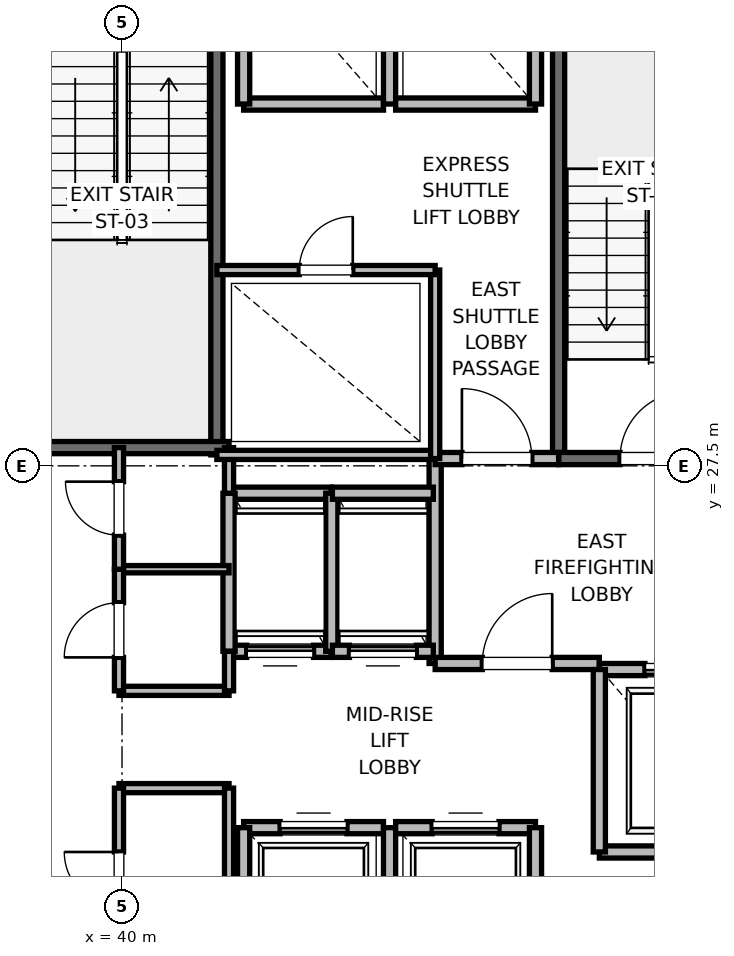
"""IFC4 building model, lengths in metres.
Left out: names, types, materials, properties, quantities, classifications, styles, units other than length and angle.
Written with IfcOpenShell. Run it as: python <this file> out.ifc"""

import sys

from ifc_helpers import new_model, si_unit, direction, frame, frame_2d, origin, place, context, subcontext, project, spatial, rectangle, extrude, element, fill, save


model = new_model("IFC4")
c1 = context("Model", 3, precision=1e-05, world=origin(), true_north=direction((0.0, 1.0)))
c2 = subcontext(c1, "Body", "Model", "MODEL_VIEW")
j1 = project(units=[si_unit("LENGTHUNIT", "METRE"), si_unit("PLANEANGLEUNIT", "RADIAN")], contexts=[c1])
p1 = place(None, origin())
s1 = spatial("IfcSite", under=j1, at=p1, CompositionType="ELEMENT")
p2 = place(p1, origin())
s2 = spatial("IfcBuilding", under=s1, at=p2, CompositionType="ELEMENT")
p3 = place(p2, frame((0.0, 0.0, 176.4)))
s3 = spatial("IfcBuildingStorey", under=s2, at=p3, CompositionType="ELEMENT", Elevation=176.4)
p4 = place(p3, frame((47.18, 27.62, 0.0), z_axis=(0.0, 0.0, 1.0), x_axis=(0.0, 1.0, 0.0)))
e1 = element("IfcWall", 1, at=p4, inside=s3, PredefinedType="SOLIDWALL", context=c2, shape_type="SweptSolid", body=[
    extrude(rectangle(XDim=8.18, YDim=0.2, at=frame_2d((4.09, 0.0))), origin(), (0.0, 0.0, 1.0), 3.775),
])
p5 = place(p3, frame((47.18, 27.62, 0.0), z_axis=(0.0, 0.0, 1.0), x_axis=(1.0, 0.0, 0.0)))
e2 = element("IfcWall", 2, at=p5, inside=s3, PredefinedType="SOLIDWALL", context=c2, shape_type="SweptSolid", body=[
    extrude(rectangle(XDim=3.12, YDim=0.2, at=frame_2d((1.56, 0.0))), origin(), (0.0, 0.0, 1.0), 3.775),
])
p6 = place(p5, frame((1.01, 0.0, 0.0)))
e3 = element("IfcOpeningElement", 3, at=p6, cuts=e2, PredefinedType="OPENING", context=c2, shape_type="SweptSolid", body=[
    extrude(rectangle(XDim=1.1, YDim=2.15, at=frame_2d((0.55, 1.075))), frame((0.0, 0.1, 0.0), z_axis=(0.0, -1.0, 0.0), x_axis=(1.0, 0.0, 0.0)), (0.0, 0.0, 1.0), 0.2),
])
p7 = place(p3, frame((41.56, 27.68, 0.0), z_axis=(0.0, 0.0, 1.0), x_axis=(0.0, 1.0, 0.0)))
e4 = element("IfcWall", 4, at=p7, inside=s3, PredefinedType="SOLIDWALL", context=c2, shape_type="SweptSolid", body=[
    extrude(rectangle(XDim=8.57, YDim=0.2, at=frame_2d((4.285, 0.0))), origin(), (0.0, 0.0, 1.0), 3.775),
])
p8 = place(p3, frame((38.44, 27.8, 0.0), z_axis=(0.0, 0.0, 1.0), x_axis=(1.0, 0.0, 0.0)))
e5 = element("IfcWall", 5, at=p8, inside=s3, PredefinedType="SOLIDWALL", context=c2, shape_type="SweptSolid", body=[
    extrude(rectangle(XDim=3.32, YDim=0.2, at=frame_2d((1.66, 0.0))), origin(), (0.0, 0.0, 1.0), 3.775),
])
p9 = place(p3, frame((45.15, 24.25, 0.0), z_axis=(0.0, 0.0, 1.0), x_axis=(0.0, 1.0, 0.0)))
e6 = element("IfcWall", 6, at=p9, inside=s3, PredefinedType="PARTITIONING", context=c2, shape_type="SweptSolid", body=[
    extrude(rectangle(XDim=3.37, YDim=0.2, at=frame_2d((1.685, 0.0))), origin(), (0.0, 0.0, 1.0), 3.775),
])
p10 = place(p3, frame((45.15, 24.25, 0.0), z_axis=(0.0, 0.0, 1.0), x_axis=(1.0, 0.0, 0.0)))
e7 = element("IfcWall", 7, at=p10, inside=s3, PredefinedType="PARTITIONING", context=c2, shape_type="SweptSolid", body=[
    extrude(rectangle(XDim=2.7, YDim=0.2, at=frame_2d((1.35, 0.0))), origin(), (0.0, 0.0, 1.0), 3.775),
])
p11 = place(p10, frame((0.775, 0.0, 0.0)))
e8 = element("IfcOpeningElement", 8, at=p11, cuts=e7, PredefinedType="OPENING", context=c2, shape_type="SweptSolid", body=[
    extrude(rectangle(XDim=1.15, YDim=2.2, at=frame_2d((0.575, 1.1))), frame((0.0, 0.1, 0.0), z_axis=(0.0, -1.0, 0.0), x_axis=(1.0, 0.0, 0.0)), (0.0, 0.0, 1.0), 0.2),
])
p12 = place(p3, frame((45.15, 27.62, 0.0), z_axis=(0.0, 0.0, 1.0), x_axis=(1.0, 0.0, 0.0)))
e9 = element("IfcWall", 9, at=p12, inside=s3, PredefinedType="PARTITIONING", context=c2, shape_type="SweptSolid", body=[
    extrude(rectangle(XDim=2.03, YDim=0.2, at=frame_2d((1.015, 0.0))), origin(), (0.0, 0.0, 1.0), 3.775),
])
p13 = place(p12, frame((0.44, 0.0, 0.0)))
e10 = element("IfcOpeningElement", 10, at=p13, cuts=e9, PredefinedType="OPENING", context=c2, shape_type="SweptSolid", body=[
    extrude(rectangle(XDim=1.15, YDim=2.2, at=frame_2d((0.575, 1.1))), frame((0.0, 0.1, 0.0), z_axis=(0.0, -1.0, 0.0), x_axis=(1.0, 0.0, 0.0)), (0.0, 0.0, 1.0), 0.2),
])
p14 = place(p3, frame((47.85, 21.15, 0.0), z_axis=(0.0, 0.0, 1.0), x_axis=(1.0, 0.0, 0.0)))
e11 = element("IfcWall", 11, at=p14, inside=s3, PredefinedType="SOLIDWALL", context=c2, shape_type="SweptSolid", body=[
    extrude(rectangle(XDim=2.6, YDim=0.2, at=frame_2d((1.3, 0.0))), origin(), (0.0, 0.0, 1.0), 3.775),
])
p15 = place(p3, frame((50.45, 24.15, 0.0), z_axis=(0.0, 0.0, 1.0), x_axis=(-1.0, 0.0, 0.0)))
e12 = element("IfcWall", 12, at=p15, inside=s3, PredefinedType="SOLIDWALL", context=c2, shape_type="SweptSolid", body=[
    extrude(rectangle(XDim=2.6, YDim=0.2, at=frame_2d((1.3, 0.0))), origin(), (0.0, 0.0, 1.0), 2.755),
])
p16 = place(p15, frame((0.75, 0.0, 0.0)))
e13 = element("IfcOpeningElement", 13, at=p16, cuts=e12, PredefinedType="OPENING", context=c2, shape_type="SweptSolid", body=[
    extrude(rectangle(XDim=1.1, YDim=2.2, at=frame_2d((0.55, 1.1))), frame((0.0, 0.1, 0.0), z_axis=(0.0, -1.0, 0.0), x_axis=(1.0, 0.0, 0.0)), (0.0, 0.0, 1.0), 0.2),
])
p17 = place(p3, frame((47.85, 24.15, 0.0), z_axis=(0.0, 0.0, 1.0), x_axis=(0.0, -1.0, 0.0)))
e14 = element("IfcWall", 14, at=p17, inside=s3, PredefinedType="SOLIDWALL", context=c2, shape_type="SweptSolid", body=[
    extrude(rectangle(XDim=3.0, YDim=0.2, at=frame_2d((1.5, 0.0))), origin(), (0.0, 0.0, 1.0), 3.775),
])
p18 = place(p3, frame((44.3, 21.55, 0.0), z_axis=(0.0, 0.0, 1.0), x_axis=(-1.0, 0.0, 0.0)))
e15 = element("IfcWall", 15, at=p18, inside=s3, PredefinedType="SOLIDWALL", context=c2, shape_type="SweptSolid", body=[
    extrude(rectangle(XDim=2.3, YDim=0.2, at=frame_2d((1.15, 0.0))), origin(), (0.0, 0.0, 1.0), 3.775),
])
p19 = place(p18, frame((0.6, 0.0, 0.0)))
e16 = element("IfcOpeningElement", 16, at=p19, cuts=e15, PredefinedType="OPENING", context=c2, shape_type="SweptSolid", body=[
    extrude(rectangle(XDim=1.1, YDim=2.2, at=frame_2d((0.55, 1.1))), frame((0.0, 0.1, 0.0), z_axis=(0.0, -1.0, 0.0), x_axis=(1.0, 0.0, 0.0)), (0.0, 0.0, 1.0), 0.2),
])
p20 = place(p3, frame((42.0, 21.55, 0.0), z_axis=(0.0, 0.0, 1.0), x_axis=(0.0, -1.0, 0.0)))
e17 = element("IfcWall", 17, at=p20, inside=s3, PredefinedType="SOLIDWALL", context=c2, shape_type="SweptSolid", body=[
    extrude(rectangle(XDim=2.6, YDim=0.2, at=frame_2d((1.3, 0.0))), origin(), (0.0, 0.0, 1.0), 2.755),
])
p21 = place(p3, frame((44.4, 18.95, 0.0), z_axis=(0.0, 0.0, 1.0), x_axis=(0.0, 1.0, 0.0)))
e18 = element("IfcWall", 18, at=p21, inside=s3, PredefinedType="SOLIDWALL", context=c2, shape_type="SweptSolid", body=[
    extrude(rectangle(XDim=2.6, YDim=0.2, at=frame_2d((1.3, 0.0))), origin(), (0.0, 0.0, 1.0), 3.775),
])
p22 = place(p3, frame((46.8, 21.55, 0.0), z_axis=(0.0, 0.0, 1.0), x_axis=(-1.0, 0.0, 0.0)))
e19 = element("IfcWall", 19, at=p22, inside=s3, PredefinedType="SOLIDWALL", context=c2, shape_type="SweptSolid", body=[
    extrude(rectangle(XDim=2.3, YDim=0.2, at=frame_2d((1.15, 0.0))), origin(), (0.0, 0.0, 1.0), 3.775),
])
p23 = place(p22, frame((0.6, 0.0, 0.0)))
e20 = element("IfcOpeningElement", 20, at=p23, cuts=e19, PredefinedType="OPENING", context=c2, shape_type="SweptSolid", body=[
    extrude(rectangle(XDim=1.1, YDim=2.2, at=frame_2d((0.55, 1.1))), frame((0.0, 0.1, 0.0), z_axis=(0.0, -1.0, 0.0), x_axis=(1.0, 0.0, 0.0)), (0.0, 0.0, 1.0), 0.2),
])
p24 = place(p3, frame((46.8, 18.95, 0.0), z_axis=(0.0, 0.0, 1.0), x_axis=(0.0, 1.0, 0.0)))
e21 = element("IfcWall", 21, at=p24, inside=s3, PredefinedType="SOLIDWALL", context=c2, shape_type="SweptSolid", body=[
    extrude(rectangle(XDim=2.6, YDim=0.2, at=frame_2d((1.3, 0.0))), origin(), (0.0, 0.0, 1.0), 3.775),
])
p25 = place(p3, frame((41.76, 24.45, 0.0), z_axis=(0.0, 0.0, 1.0), x_axis=(1.0, 0.0, 0.0)))
e22 = element("IfcWall", 22, at=p25, inside=s3, PredefinedType="SOLIDWALL", context=c2, shape_type="SweptSolid", body=[
    extrude(rectangle(XDim=1.68, YDim=0.2, at=frame_2d((0.84, 0.0))), origin(), (0.0, 0.0, 1.0), 3.775),
])
p26 = place(p25, frame((0.29, 0.0, 0.0)))
e23 = element("IfcOpeningElement", 23, at=p26, cuts=e22, PredefinedType="OPENING", context=c2, shape_type="SweptSolid", body=[
    extrude(rectangle(XDim=1.1, YDim=2.2, at=frame_2d((0.55, 1.1))), frame((0.0, 0.1, 0.0), z_axis=(0.0, -1.0, 0.0), x_axis=(1.0, 0.0, 0.0)), (0.0, 0.0, 1.0), 0.2),
])
p27 = place(p3, frame((43.44, 27.05, 0.0), z_axis=(0.0, 0.0, 1.0), x_axis=(-1.0, 0.0, 0.0)))
e24 = element("IfcWall", 24, at=p27, inside=s3, PredefinedType="SOLIDWALL", context=c2, shape_type="SweptSolid", body=[
    extrude(rectangle(XDim=1.68, YDim=0.2, at=frame_2d((0.84, 0.0))), origin(), (0.0, 0.0, 1.0), 3.775),
])
for number, where, z_axis, x_axis in (
    (25, (41.76, 27.05, 0.0), (0.0, 0.0, 1.0), (0.0, -1.0, 0.0)),
    (26, (43.45, 24.45, 0.0), (0.0, 0.0, 1.0), (0.0, 1.0, 0.0)),
):
    element("IfcWall", number, at=place(p3, frame(where, z_axis=z_axis, x_axis=x_axis)), inside=s3, PredefinedType="SOLIDWALL", context=c2, shape_type="SweptSolid", body=[
        extrude(rectangle(XDim=2.6, YDim=0.2, at=frame_2d((1.3, 0.0))), origin(), (0.0, 0.0, 1.0), 3.775),
    ])
p28 = place(p3, frame((43.46, 24.45, 0.0), z_axis=(0.0, 0.0, 1.0), x_axis=(1.0, 0.0, 0.0)))
e27 = element("IfcWall", 27, at=p28, inside=s3, PredefinedType="SOLIDWALL", context=c2, shape_type="SweptSolid", body=[
    extrude(rectangle(XDim=1.66, YDim=0.2, at=frame_2d((0.83, 0.0))), origin(), (0.0, 0.0, 1.0), 3.775),
])
p29 = place(p28, frame((0.28, 0.0, 0.0)))
e28 = element("IfcOpeningElement", 28, at=p29, cuts=e27, PredefinedType="OPENING", context=c2, shape_type="SweptSolid", body=[
    extrude(rectangle(XDim=1.1, YDim=2.2, at=frame_2d((0.55, 1.1))), frame((0.0, 0.1, 0.0), z_axis=(0.0, -1.0, 0.0), x_axis=(1.0, 0.0, 0.0)), (0.0, 0.0, 1.0), 0.2),
])
p30 = place(p3, frame((45.12, 27.05, 0.0), z_axis=(0.0, 0.0, 1.0), x_axis=(-1.0, 0.0, 0.0)))
e29 = element("IfcWall", 29, at=p30, inside=s3, PredefinedType="SOLIDWALL", context=c2, shape_type="SweptSolid", body=[
    extrude(rectangle(XDim=1.66, YDim=0.2, at=frame_2d((0.83, 0.0))), origin(), (0.0, 0.0, 1.0), 3.775),
])
p31 = place(p3, frame((42.0, 33.45, 0.0), z_axis=(0.0, 0.0, 1.0), x_axis=(1.0, 0.0, 0.0)))
e30 = element("IfcWall", 30, at=p31, inside=s3, PredefinedType="SOLIDWALL", context=c2, shape_type="SweptSolid", body=[
    extrude(rectangle(XDim=2.3, YDim=0.2, at=frame_2d((1.15, 0.0))), origin(), (0.0, 0.0, 1.0), 3.775),
])
for number, where, z_axis, x_axis in (
    (31, (42.0, 36.05, 0.0), (0.0, 0.0, 1.0), (0.0, -1.0, 0.0)),
    (32, (44.4, 33.45, 0.0), (0.0, 0.0, 1.0), (0.0, 1.0, 0.0)),
):
    element("IfcWall", number, at=place(p3, frame(where, z_axis=z_axis, x_axis=x_axis)), inside=s3, PredefinedType="SOLIDWALL", context=c2, shape_type="SweptSolid", body=[
        extrude(rectangle(XDim=2.6, YDim=0.2, at=frame_2d((1.3, 0.0))), origin(), (0.0, 0.0, 1.0), 2.755),
    ])
p32 = place(p3, frame((44.5, 33.45, 0.0), z_axis=(0.0, 0.0, 1.0), x_axis=(1.0, 0.0, 0.0)))
e33 = element("IfcWall", 33, at=p32, inside=s3, PredefinedType="SOLIDWALL", context=c2, shape_type="SweptSolid", body=[
    extrude(rectangle(XDim=2.3, YDim=0.2, at=frame_2d((1.15, 0.0))), origin(), (0.0, 0.0, 1.0), 3.775),
])
p33 = place(p3, frame((46.8, 33.45, 0.0), z_axis=(0.0, 0.0, 1.0), x_axis=(0.0, 1.0, 0.0)))
e34 = element("IfcWall", 34, at=p33, inside=s3, PredefinedType="SOLIDWALL", context=c2, shape_type="SweptSolid", body=[
    extrude(rectangle(XDim=2.6, YDim=0.2, at=frame_2d((1.3, 0.0))), origin(), (0.0, 0.0, 1.0), 3.775),
])
for number, where, z_axis, x_axis in (
    (35, (39.95, 22.2, 0.0), (0.0, 0.0, 1.0), (1.0, 0.0, 0.0)),
    (36, (39.95, 23.8, 0.0), (0.0, 0.0, 1.0), (1.0, 0.0, 0.0)),
):
    element("IfcWall", number, at=place(p3, frame(where, z_axis=z_axis, x_axis=x_axis)), inside=s3, PredefinedType="PARTITIONING", context=c2, shape_type="SweptSolid", body=[
        extrude(rectangle(XDim=1.81, YDim=0.15, at=frame_2d((0.905, 0.0))), origin(), (0.0, 0.0, 1.0), 2.85),
    ])
p34 = place(p3, frame((39.95, 25.8, 0.0), z_axis=(0.0, 0.0, 1.0), x_axis=(1.0, 0.0, 0.0)))
e37 = element("IfcWall", 37, at=p34, inside=s3, PredefinedType="PARTITIONING", context=c2, shape_type="SweptSolid", body=[
    extrude(rectangle(XDim=1.81, YDim=0.12, at=frame_2d((0.905, 0.0))), origin(), (0.0, 0.0, 1.0), 2.85),
])
p35 = place(p3, frame((41.76, 18.6, 0.0), z_axis=(0.0, 0.0, 1.0), x_axis=(0.0, 1.0, 0.0)))
e38 = element("IfcWall", 38, at=p35, inside=s3, PredefinedType="PARTITIONING", context=c2, shape_type="SweptSolid", body=[
    extrude(rectangle(XDim=3.6, YDim=0.15, at=frame_2d((1.8, 0.0))), origin(), (0.0, 0.0, 1.0), 2.755),
])
p36 = place(p3, frame((41.76, 23.8, 0.0), z_axis=(0.0, 0.0, 1.0), x_axis=(0.0, 1.0, 0.0)))
e39 = element("IfcWall", 39, at=p36, inside=s3, PredefinedType="PARTITIONING", context=c2, shape_type="SweptSolid", body=[
    extrude(rectangle(XDim=0.65, YDim=0.15, at=frame_2d((0.325, 0.0))), origin(), (0.0, 0.0, 1.0), 2.85),
])
p37 = place(p3, frame((41.76, 27.05, 0.0), z_axis=(0.0, 0.0, 1.0), x_axis=(0.0, 1.0, 0.0)))
e40 = element("IfcWall", 40, at=p37, inside=s3, PredefinedType="PARTITIONING", context=c2, shape_type="SweptSolid", body=[
    extrude(rectangle(XDim=0.75, YDim=0.15, at=frame_2d((0.375, 0.0))), origin(), (0.0, 0.0, 1.0), 2.85),
])
p38 = place(p3, frame((39.95, 19.2, 0.0), z_axis=(0.0, 0.0, 1.0), x_axis=(0.0, 1.0, 0.0)))
e41 = element("IfcWall", 41, at=p38, inside=s3, PredefinedType="PARTITIONING", context=c2, shape_type="SweptSolid", body=[
    extrude(rectangle(XDim=3.0, YDim=0.15, at=frame_2d((1.5, 0.0))), origin(), (0.0, 0.0, 1.0), 2.85),
])
p39 = place(p38, frame((1.05, 0.0, 0.0)))
e42 = element("IfcOpeningElement", 42, at=p39, cuts=e41, PredefinedType="OPENING", context=c2, shape_type="SweptSolid", body=[
    extrude(rectangle(XDim=0.9, YDim=2.1, at=frame_2d((0.45, 1.05))), frame((0.0, 0.075, 0.0), z_axis=(0.0, -1.0, 0.0), x_axis=(1.0, 0.0, 0.0)), (0.0, 0.0, 1.0), 0.15),
])
p40 = place(p3, frame((39.95, 23.8, 0.0), z_axis=(0.0, 0.0, 1.0), x_axis=(0.0, 1.0, 0.0)))
e43 = element("IfcWall", 43, at=p40, inside=s3, PredefinedType="PARTITIONING", context=c2, shape_type="SweptSolid", body=[
    extrude(rectangle(XDim=2.0, YDim=0.15, at=frame_2d((1.0, 0.0))), origin(), (0.0, 0.0, 1.0), 2.85),
])
p41 = place(p40, frame((0.55, 0.0, 0.0)))
e44 = element("IfcOpeningElement", 44, at=p41, cuts=e43, PredefinedType="OPENING", context=c2, shape_type="SweptSolid", body=[
    extrude(rectangle(XDim=0.9, YDim=2.1, at=frame_2d((0.45, 1.05))), frame((0.0, 0.075, 0.0), z_axis=(0.0, -1.0, 0.0), x_axis=(1.0, 0.0, 0.0)), (0.0, 0.0, 1.0), 0.15),
])
p42 = place(p3, frame((39.95, 25.8, 0.0), z_axis=(0.0, 0.0, 1.0), x_axis=(0.0, 1.0, 0.0)))
e45 = element("IfcWall", 45, at=p42, inside=s3, PredefinedType="PARTITIONING", context=c2, shape_type="SweptSolid", body=[
    extrude(rectangle(XDim=2.0, YDim=0.15, at=frame_2d((1.0, 0.0))), origin(), (0.0, 0.0, 1.0), 2.85),
])
p43 = place(p42, frame((0.56, 0.0, 0.0)))
e46 = element("IfcOpeningElement", 46, at=p43, cuts=e45, PredefinedType="OPENING", context=c2, shape_type="SweptSolid", body=[
    extrude(rectangle(XDim=0.88, YDim=2.1, at=frame_2d((0.44, 1.05))), frame((0.0, 0.075, 0.0), z_axis=(0.0, -1.0, 0.0), x_axis=(1.0, 0.0, 0.0)), (0.0, 0.0, 1.0), 0.15),
])
p44 = place(p3, frame((41.56, 27.68, 0.0), z_axis=(0.0, 0.0, 1.0), x_axis=(1.0, 0.0, 0.0)))
e47 = element("IfcWall", 47, at=p44, inside=s3, PredefinedType="PARTITIONING", context=c2, shape_type="SweptSolid", body=[
    extrude(rectangle(XDim=3.59, YDim=0.15, at=frame_2d((1.795, 0.0))), origin(), (0.0, 0.0, 1.0), 2.85),
])
p45 = place(p3, frame((45.15, 27.62, 0.0), z_axis=(0.0, 0.0, 1.0), x_axis=(0.0, 1.0, 0.0)))
e48 = element("IfcWall", 48, at=p45, inside=s3, PredefinedType="PARTITIONING", context=c2, shape_type="SweptSolid", body=[
    extrude(rectangle(XDim=3.1, YDim=0.15, at=frame_2d((1.55, 0.0))), origin(), (0.0, 0.0, 1.0), 2.85),
])
p46 = place(p3, frame((41.56, 30.72, 0.0), z_axis=(0.0, 0.0, 1.0), x_axis=(1.0, 0.0, 0.0)))
e49 = element("IfcWall", 49, at=p46, inside=s3, PredefinedType="PARTITIONING", context=c2, shape_type="SweptSolid", body=[
    extrude(rectangle(XDim=3.59, YDim=0.15, at=frame_2d((1.795, 0.0))), origin(), (0.0, 0.0, 1.0), 2.85),
])
p47 = place(p46, frame((1.355, 0.0, 0.0)))
e50 = element("IfcOpeningElement", 50, at=p47, cuts=e49, PredefinedType="OPENING", context=c2, shape_type="SweptSolid", body=[
    extrude(rectangle(XDim=0.88, YDim=2.1, at=frame_2d((0.44, 1.05))), frame((0.0, 0.075, 0.0), z_axis=(0.0, -1.0, 0.0), x_axis=(1.0, 0.0, 0.0)), (0.0, 0.0, 1.0), 0.15),
])
p48 = place(p6, origin())
e51 = element("IfcDoor", 51, at=p48, inside=s3, OperationType="SINGLE_SWING_RIGHT", PredefinedType="DOOR", context=c2, shape_type="SweptSolid", body=[
    extrude(rectangle(XDim=1.1, YDim=2.15, at=frame_2d((0.55, 1.075))), frame((0.0, 0.025, 0.0), z_axis=(0.0, -1.0, 0.0), x_axis=(1.0, 0.0, 0.0)), (0.0, 0.0, 1.0), 0.05),
])
fill(e3, e51)
p49 = place(p11, origin())
e52 = element("IfcDoor", 52, at=p49, inside=s3, OperationType="SINGLE_SWING_RIGHT", PredefinedType="DOOR", context=c2, shape_type="SweptSolid", body=[
    extrude(rectangle(XDim=1.15, YDim=2.2, at=frame_2d((0.575, 1.1))), frame((0.0, 0.025, 0.0), z_axis=(0.0, -1.0, 0.0), x_axis=(1.0, 0.0, 0.0)), (0.0, 0.0, 1.0), 0.05),
])
fill(e8, e52)
p50 = place(p13, origin())
e53 = element("IfcDoor", 53, at=p50, inside=s3, OperationType="SINGLE_SWING_LEFT", PredefinedType="DOOR", context=c2, shape_type="SweptSolid", body=[
    extrude(rectangle(XDim=1.15, YDim=2.2, at=frame_2d((0.575, 1.1))), frame((0.0, 0.025, 0.0), z_axis=(0.0, -1.0, 0.0), x_axis=(1.0, 0.0, 0.0)), (0.0, 0.0, 1.0), 0.05),
])
fill(e10, e53)
p51 = place(p16, origin())
e54 = element("IfcDoor", 54, at=p51, inside=s3, OperationType="SLIDING_TO_RIGHT", PredefinedType="DOOR", context=c2, shape_type="SweptSolid", body=[
    extrude(rectangle(XDim=1.1, YDim=2.2, at=frame_2d((0.55, 1.1))), frame((0.0, 0.025, 0.0), z_axis=(0.0, -1.0, 0.0), x_axis=(1.0, 0.0, 0.0)), (0.0, 0.0, 1.0), 0.05),
])
fill(e13, e54)
p52 = place(p19, origin())
e55 = element("IfcDoor", 55, at=p52, inside=s3, OperationType="SLIDING_TO_RIGHT", PredefinedType="DOOR", context=c2, shape_type="SweptSolid", body=[
    extrude(rectangle(XDim=1.1, YDim=2.2, at=frame_2d((0.55, 1.1))), frame((0.0, 0.025, 0.0), z_axis=(0.0, -1.0, 0.0), x_axis=(1.0, 0.0, 0.0)), (0.0, 0.0, 1.0), 0.05),
])
fill(e16, e55)
p53 = place(p23, origin())
e56 = element("IfcDoor", 56, at=p53, inside=s3, OperationType="SLIDING_TO_RIGHT", PredefinedType="DOOR", context=c2, shape_type="SweptSolid", body=[
    extrude(rectangle(XDim=1.1, YDim=2.2, at=frame_2d((0.55, 1.1))), frame((0.0, 0.025, 0.0), z_axis=(0.0, -1.0, 0.0), x_axis=(1.0, 0.0, 0.0)), (0.0, 0.0, 1.0), 0.05),
])
fill(e20, e56)
p54 = place(p26, origin())
e57 = element("IfcDoor", 57, at=p54, inside=s3, OperationType="SLIDING_TO_RIGHT", PredefinedType="DOOR", context=c2, shape_type="SweptSolid", body=[
    extrude(rectangle(XDim=1.1, YDim=2.2, at=frame_2d((0.55, 1.1))), frame((0.0, 0.025, 0.0), z_axis=(0.0, -1.0, 0.0), x_axis=(1.0, 0.0, 0.0)), (0.0, 0.0, 1.0), 0.05),
])
fill(e23, e57)
p55 = place(p29, origin())
e58 = element("IfcDoor", 58, at=p55, inside=s3, OperationType="SLIDING_TO_RIGHT", PredefinedType="DOOR", context=c2, shape_type="SweptSolid", body=[
    extrude(rectangle(XDim=1.1, YDim=2.2, at=frame_2d((0.55, 1.1))), frame((0.0, 0.025, 0.0), z_axis=(0.0, -1.0, 0.0), x_axis=(1.0, 0.0, 0.0)), (0.0, 0.0, 1.0), 0.05),
])
fill(e28, e58)
p56 = place(p39, origin())
e59 = element("IfcDoor", 59, at=p56, inside=s3, OperationType="SINGLE_SWING_RIGHT", PredefinedType="DOOR", context=c2, shape_type="SweptSolid", body=[
    extrude(rectangle(XDim=0.9, YDim=2.1, at=frame_2d((0.45, 1.05))), frame((0.0, 0.025, 0.0), z_axis=(0.0, -1.0, 0.0), x_axis=(1.0, 0.0, 0.0)), (0.0, 0.0, 1.0), 0.05),
])
fill(e42, e59)
p57 = place(p41, origin())
e60 = element("IfcDoor", 60, at=p57, inside=s3, OperationType="SINGLE_SWING_LEFT", PredefinedType="DOOR", context=c2, shape_type="SweptSolid", body=[
    extrude(rectangle(XDim=0.9, YDim=2.1, at=frame_2d((0.45, 1.05))), frame((0.0, 0.025, 0.0), z_axis=(0.0, -1.0, 0.0), x_axis=(1.0, 0.0, 0.0)), (0.0, 0.0, 1.0), 0.05),
])
fill(e44, e60)
p58 = place(p43, origin())
e61 = element("IfcDoor", 61, at=p58, inside=s3, OperationType="SINGLE_SWING_RIGHT", PredefinedType="DOOR", context=c2, shape_type="SweptSolid", body=[
    extrude(rectangle(XDim=0.88, YDim=2.1, at=frame_2d((0.44, 1.05))), frame((0.0, 0.025, 0.0), z_axis=(0.0, -1.0, 0.0), x_axis=(1.0, 0.0, 0.0)), (0.0, 0.0, 1.0), 0.05),
])
fill(e46, e61)
p59 = place(p47, origin())
e62 = element("IfcDoor", 62, at=p59, inside=s3, OperationType="SINGLE_SWING_RIGHT", PredefinedType="DOOR", context=c2, shape_type="SweptSolid", body=[
    extrude(rectangle(XDim=0.88, YDim=2.1, at=frame_2d((0.44, 1.05))), frame((0.0, 0.025, 0.0), z_axis=(0.0, -1.0, 0.0), x_axis=(1.0, 0.0, 0.0)), (0.0, 0.0, 1.0), 0.05),
])
fill(e50, e62)
save(model, sys.argv[1])
